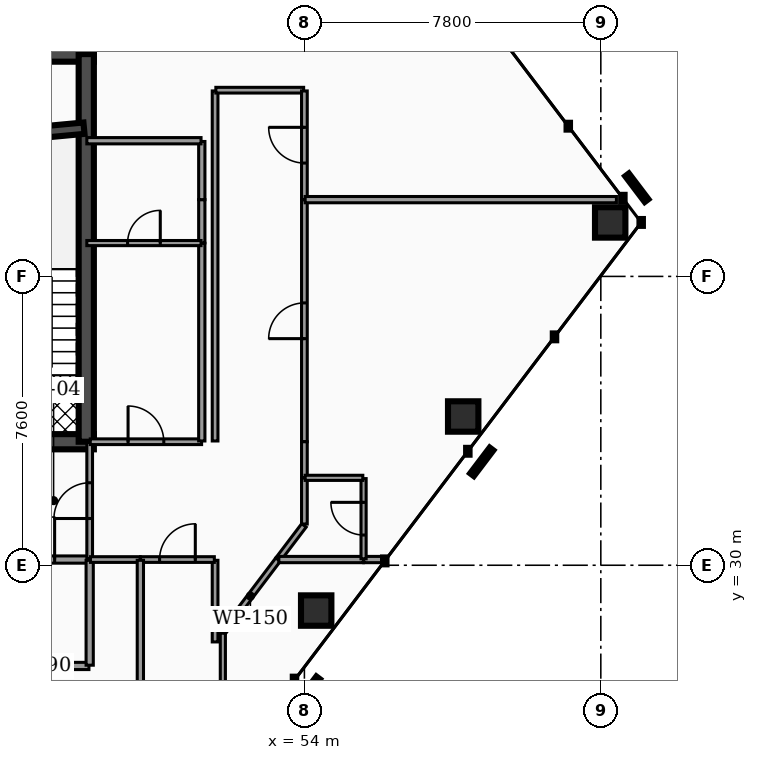
"""IFC4 building model, lengths in metres.
Left out: names, types, materials, properties, quantities, classifications, styles, units other than length and angle.
Written with IfcOpenShell. Run it as: python <this file> out.ifc"""

import sys

from ifc_helpers import new_model, si_unit, direction, frame, frame_2d, origin, origin_2d, place, context, subcontext, project, spatial, rectangle, hollow_rectangle, extrude, element, fill, save


model = new_model("IFC4")
c1 = context("Model", 3, precision=1e-05, world=origin(), true_north=direction((0.0, 1.0)))
c2 = subcontext(c1, "Body", "Model", "MODEL_VIEW")
j1 = project(units=[si_unit("LENGTHUNIT", "METRE"), si_unit("PLANEANGLEUNIT", "RADIAN")], contexts=[c1])
p1 = place(None, origin())
s1 = spatial("IfcSite", under=j1, at=p1, CompositionType="ELEMENT")
p2 = place(p1, origin())
s2 = spatial("IfcBuilding", under=s1, at=p2, CompositionType="ELEMENT")
p3 = place(p2, frame((0.0, 0.0, 142.12)))
s3 = spatial("IfcBuildingStorey", under=s2, at=p3, CompositionType="ELEMENT", Elevation=142.12)
p4 = place(p3, frame((28.4, 43.45, 0.0), z_axis=(0.0, 0.0, 1.0), x_axis=(1.0, 0.0, 0.0)))
e1 = element("IfcWall", 1, at=p4, inside=s3, PredefinedType="SHEAR", context=c2, shape_type="SweptSolid", body=[
    extrude(rectangle(XDim=20.06, YDim=0.4, at=frame_2d((10.03, 0.0))), origin(), (0.0, 0.0, 1.0), 3.5),
])
p5 = place(p3, frame((28.4, 33.25, 0.0), z_axis=(0.0, 0.0, 1.0), x_axis=(1.0, 0.0, 0.0)))
e2 = element("IfcWall", 2, at=p5, inside=s3, PredefinedType="SHEAR", context=c2, shape_type="SweptSolid", body=[
    extrude(rectangle(XDim=20.06, YDim=0.4, at=frame_2d((10.03, 0.0))), origin(), (0.0, 0.0, 1.0), 3.5),
])
p6 = place(p5, frame((4.03, 0.0, 0.0)))
e3 = element("IfcOpeningElement", 3, at=p6, cuts=e2, PredefinedType="OPENING", context=c2, shape_type="SweptSolid", body=[
    extrude(rectangle(XDim=1.1, YDim=2.15, at=frame_2d((0.55, 1.075))), frame((0.0, 0.21, 0.0), z_axis=(0.0, -1.0, 0.0), x_axis=(1.0, 0.0, 0.0)), (0.0, 0.0, 1.0), 0.42),
])
p7 = place(p5, frame((14.87, 0.0, 0.0)))
e4 = element("IfcOpeningElement", 4, at=p7, cuts=e2, PredefinedType="OPENING", context=c2, shape_type="SweptSolid", body=[
    extrude(rectangle(XDim=1.1, YDim=2.15, at=frame_2d((0.55, 1.075))), frame((0.0, 0.21, 0.0), z_axis=(0.0, -1.0, 0.0), x_axis=(1.0, 0.0, 0.0)), (0.0, 0.0, 1.0), 0.42),
])
p8 = place(p5, frame((5.95, 0.0, 0.0)))
e5 = element("IfcOpeningElement", 5, at=p8, cuts=e2, PredefinedType="OPENING", context=c2, shape_type="SweptSolid", body=[
    extrude(rectangle(XDim=1.0, YDim=2.1, at=frame_2d((0.5, 1.05))), frame((0.0, 0.21, 0.0), z_axis=(0.0, -1.0, 0.0), x_axis=(1.0, 0.0, 0.0)), (0.0, 0.0, 1.0), 0.42),
])
p9 = place(p5, frame((7.65, 0.0, 0.0)))
e6 = element("IfcOpeningElement", 6, at=p9, cuts=e2, PredefinedType="OPENING", context=c2, shape_type="SweptSolid", body=[
    extrude(rectangle(XDim=1.0, YDim=2.1, at=frame_2d((0.5, 1.05))), frame((0.0, 0.21, 0.0), z_axis=(0.0, -1.0, 0.0), x_axis=(1.0, 0.0, 0.0)), (0.0, 0.0, 1.0), 0.42),
])
p10 = place(p5, frame((1.31, 0.0, 0.0)))
e7 = element("IfcOpeningElement", 7, at=p10, cuts=e2, PredefinedType="OPENING", context=c2, shape_type="SweptSolid", body=[
    extrude(rectangle(XDim=1.1, YDim=2.2, at=frame_2d((0.55, 1.1))), frame((0.0, 0.21, 0.0), z_axis=(0.0, -1.0, 0.0), x_axis=(1.0, 0.0, 0.0)), (0.0, 0.0, 1.0), 0.42),
])
p11 = place(p5, frame((9.44, 0.0, 0.0)))
e8 = element("IfcOpeningElement", 8, at=p11, cuts=e2, PredefinedType="OPENING", context=c2, shape_type="SweptSolid", body=[
    extrude(rectangle(XDim=1.12, YDim=2.05, at=frame_2d((0.56, 1.025))), frame((0.0, 0.21, 0.0), z_axis=(0.0, -1.0, 0.0), x_axis=(1.0, 0.0, 0.0)), (0.0, 0.0, 1.0), 0.42),
])
p12 = place(p5, frame((17.65, 0.0, 0.0)))
e9 = element("IfcOpeningElement", 9, at=p12, cuts=e2, PredefinedType="OPENING", context=c2, shape_type="SweptSolid", body=[
    extrude(rectangle(XDim=1.1, YDim=2.2, at=frame_2d((0.55, 1.1))), frame((0.0, 0.21, 0.0), z_axis=(0.0, -1.0, 0.0), x_axis=(1.0, 0.0, 0.0)), (0.0, 0.0, 1.0), 0.42),
])
p13 = place(p3, frame((48.26, 33.25, 0.0), z_axis=(0.0, 0.0, 1.0), x_axis=(0.0, 1.0, 0.0)))
e10 = element("IfcWall", 10, at=p13, inside=s3, PredefinedType="SHEAR", context=c2, shape_type="SweptSolid", body=[
    extrude(rectangle(XDim=10.2, YDim=0.4, at=frame_2d((5.1, 0.0))), origin(), (0.0, 0.0, 1.0), 3.5),
])
p14 = place(p3, frame((44.98, 41.2, 0.0), z_axis=(0.0, 0.0, 1.0), x_axis=(0.995686468965, 0.09278176286, 0.0)))
e11 = element("IfcWall", 11, at=p14, inside=s3, PredefinedType="SHEAR", context=c2, shape_type="SweptSolid", body=[
    extrude(rectangle(XDim=3.234, YDim=0.3, at=frame_2d((1.617, 0.0))), origin(), (0.0, 0.0, 1.0), 3.5),
])
p15 = place(p3, frame((54.31, 28.808, 0.0), z_axis=(-0.036081962312, 0.038868214228, 0.998592686694), x_axis=(-0.732887043216, -0.68035033761, 0.0)))
e12 = element("IfcColumn", 12, at=p15, inside=s3, PredefinedType="COLUMN", context=c2, shape_type="SweptSolid", body=[
    extrude(hollow_rectangle(XDim=0.8, YDim=0.8, WallThickness=0.04, at=origin_2d()), origin(), (0.0, 0.0, 1.0), 3.505),
])
p16 = place(p3, frame((58.178, 33.914, 0.0), z_axis=(-0.008972958808, 0.074496425455, 0.99718091067), x_axis=(-0.992824103991, -0.119583855663, 0.0)))
e13 = element("IfcColumn", 13, at=p16, inside=s3, PredefinedType="COLUMN", context=c2, shape_type="SweptSolid", body=[
    extrude(hollow_rectangle(XDim=0.8, YDim=0.8, WallThickness=0.04, at=origin_2d()), origin(), (0.0, 0.0, 1.0), 3.51),
])
p17 = place(p3, frame((62.047, 39.02, 0.0), z_axis=(0.018023393121, 0.109873377298, 0.993782168416), x_axis=(-0.986811366095, 0.161874419675, 0.0)))
e14 = element("IfcColumn", 14, at=p17, inside=s3, PredefinedType="COLUMN", context=c2, shape_type="SweptSolid", body=[
    extrude(hollow_rectangle(XDim=0.8, YDim=0.8, WallThickness=0.04, at=origin_2d()), origin(), (0.0, 0.0, 1.0), 3.522),
])
p18 = place(p3, frame((45.405, 30.15, 0.0), z_axis=(0.0, 0.0, 1.0), x_axis=(1.0, 0.0, 0.0)))
e15 = element("IfcWall", 15, at=p18, inside=s3, PredefinedType="PARTITIONING", context=c2, shape_type="SweptSolid", body=[
    extrude(rectangle(XDim=2.925, YDim=0.19, at=frame_2d((1.462, 0.0))), origin(), (0.0, 0.0, 1.0), 2.457),
])
p19 = place(p18, frame((0.903, 0.0, 0.0)))
e16 = element("IfcOpeningElement", 16, at=p19, cuts=e15, PredefinedType="OPENING", context=c2, shape_type="SweptSolid", body=[
    extrude(rectangle(XDim=1.12, YDim=2.05, at=frame_2d((0.56, 1.025))), frame((0.0, 0.105, 0.0), z_axis=(0.0, -1.0, 0.0), x_axis=(1.0, 0.0, 0.0)), (0.0, 0.0, 1.0), 0.21),
])
p20 = place(p3, frame((48.35, 30.17, 0.0), z_axis=(0.0, 0.0, 1.0), x_axis=(0.0, 1.0, 0.0)))
e17 = element("IfcWall", 17, at=p20, inside=s3, PredefinedType="PARTITIONING", context=c2, shape_type="SweptSolid", body=[
    extrude(rectangle(XDim=3.06, YDim=0.15, at=frame_2d((1.53, 0.0))), origin(), (0.0, 0.0, 1.0), 2.457),
])
p21 = place(p20, frame((1.06, 0.0, 0.0)))
e18 = element("IfcOpeningElement", 18, at=p21, cuts=e17, PredefinedType="OPENING", context=c2, shape_type="SweptSolid", body=[
    extrude(rectangle(XDim=0.94, YDim=2.05, at=frame_2d((0.47, 1.025))), frame((0.0, 0.085, 0.0), z_axis=(0.0, -1.0, 0.0), x_axis=(1.0, 0.0, 0.0)), (0.0, 0.0, 1.0), 0.17),
])
p22 = place(p3, frame((45.42, 27.35, 0.0), z_axis=(0.0, 0.0, 1.0), x_axis=(1.0, 0.0, 0.0)))
e19 = element("IfcWall", 19, at=p22, inside=s3, PredefinedType="PARTITIONING", context=c2, shape_type="SweptSolid", body=[
    extrude(rectangle(XDim=2.91, YDim=0.19, at=frame_2d((1.455, 0.0))), origin(), (0.0, 0.0, 1.0), 2.457),
])
p23 = place(p3, frame((48.35, 27.37, 0.0), z_axis=(0.0, 0.0, 1.0), x_axis=(0.0, 1.0, 0.0)))
e20 = element("IfcWall", 20, at=p23, inside=s3, PredefinedType="PARTITIONING", context=c2, shape_type="SweptSolid", body=[
    extrude(rectangle(XDim=2.76, YDim=0.19, at=frame_2d((1.38, 0.0))), origin(), (0.0, 0.0, 1.0), 2.457),
])
p24 = place(p3, frame((48.37, 30.15, 0.0), z_axis=(0.0, 0.0, 1.0), x_axis=(1.0, 0.0, 0.0)))
e21 = element("IfcWall", 21, at=p24, inside=s3, PredefinedType="PARTITIONING", context=c2, shape_type="SweptSolid", body=[
    extrude(rectangle(XDim=1.309, YDim=0.15, at=frame_2d((0.654, 0.0))), origin(), (0.0, 0.0, 1.0), 2.457),
])
p25 = place(p3, frame((51.65, 27.982, 0.0), z_axis=(0.0, 0.0, 1.0), x_axis=(0.0, 1.0, 0.0)))
e22 = element("IfcWall", 22, at=p25, inside=s3, PredefinedType="PARTITIONING", context=c2, shape_type="SweptSolid", body=[
    extrude(rectangle(XDim=2.147, YDim=0.15, at=frame_2d((1.074, 0.0))), origin(), (0.0, 0.0, 1.0), 2.457),
])
p26 = place(p3, frame((49.689, 30.15, 0.0), z_axis=(0.0, 0.0, 1.0), x_axis=(1.0, 0.0, 0.0)))
e23 = element("IfcWall", 23, at=p26, inside=s3, PredefinedType="PARTITIONING", context=c2, shape_type="SweptSolid", body=[
    extrude(rectangle(XDim=1.941, YDim=0.15, at=frame_2d((0.971, 0.0))), origin(), (0.0, 0.0, 1.0), 2.457),
])
p27 = place(p26, frame((0.501, 0.0, 0.0)))
e24 = element("IfcOpeningElement", 24, at=p27, cuts=e23, PredefinedType="OPENING", context=c2, shape_type="SweptSolid", body=[
    extrude(rectangle(XDim=0.94, YDim=2.05, at=frame_2d((0.47, 1.025))), frame((0.0, 0.085, 0.0), z_axis=(0.0, -1.0, 0.0), x_axis=(1.0, 0.0, 0.0)), (0.0, 0.0, 1.0), 0.17),
])
p28 = place(p3, frame((51.851, 28.228, 0.0), z_axis=(0.0, 0.0, 1.0), x_axis=(0.60378553019, 0.797146808018, 0.0)))
e25 = element("IfcWall", 25, at=p28, inside=s3, PredefinedType="PARTITIONING", context=c2, shape_type="SweptSolid", body=[
    extrude(rectangle(XDim=2.41, YDim=0.15, at=frame_2d((1.205, 0.0))), origin(), (0.0, 0.0, 1.0), 2.457),
])
p29 = place(p3, frame((54.0, 33.25, 0.0), z_axis=(0.0, 0.0, 1.0), x_axis=(0.0, 1.0, 0.0)))
e26 = element("IfcWall", 26, at=p29, inside=s3, PredefinedType="PARTITIONING", context=c2, shape_type="SweptSolid", body=[
    extrude(rectangle(XDim=6.365, YDim=0.15, at=frame_2d((3.183, 0.0))), origin(), (0.0, 0.0, 1.0), 2.457),
])
p30 = place(p29, frame((2.712, 0.0, 0.0)))
e27 = element("IfcOpeningElement", 27, at=p30, cuts=e26, PredefinedType="OPENING", context=c2, shape_type="SweptSolid", body=[
    extrude(rectangle(XDim=0.94, YDim=2.05, at=frame_2d((0.47, 1.025))), frame((0.0, 0.085, 0.0), z_axis=(0.0, -1.0, 0.0), x_axis=(1.0, 0.0, 0.0)), (0.0, 0.0, 1.0), 0.17),
])
p31 = place(p3, frame((54.0, 32.305, 0.0), z_axis=(0.0, 0.0, 1.0), x_axis=(0.0, 1.0, 0.0)))
e28 = element("IfcWall", 28, at=p31, inside=s3, PredefinedType="PARTITIONING", context=c2, shape_type="SweptSolid", body=[
    extrude(rectangle(XDim=0.945, YDim=0.15, at=frame_2d((0.473, 0.0))), origin(), (0.0, 0.0, 1.0), 2.457),
])
p32 = place(p3, frame((54.0, 31.085, 0.0), z_axis=(0.0, 0.0, 1.0), x_axis=(0.0, 1.0, 0.0)))
e29 = element("IfcWall", 29, at=p32, inside=s3, PredefinedType="PARTITIONING", context=c2, shape_type="SweptSolid", body=[
    extrude(rectangle(XDim=1.21, YDim=0.15, at=frame_2d((0.605, 0.0))), origin(), (0.0, 0.0, 1.0), 2.457),
])
p33 = place(p3, frame((53.31, 30.154, 0.0), z_axis=(0.0, 0.0, 1.0), x_axis=(0.603752960425, 0.797171476395, 0.0)))
e30 = element("IfcWall", 30, at=p33, inside=s3, PredefinedType="PARTITIONING", context=c2, shape_type="SweptSolid", body=[
    extrude(rectangle(XDim=1.122, YDim=0.15, at=frame_2d((0.561, 0.0))), origin(), (0.0, 0.0, 1.0), 2.457),
])
p34 = place(p3, frame((51.65, 33.27, 0.0), z_axis=(0.0, 0.0, 1.0), x_axis=(0.0, 1.0, 0.0)))
e31 = element("IfcWall", 31, at=p34, inside=s3, PredefinedType="PARTITIONING", context=c2, shape_type="SweptSolid", body=[
    extrude(rectangle(XDim=9.21, YDim=0.15, at=frame_2d((4.605, 0.0))), origin(), (0.0, 0.0, 1.0), 2.457),
])
p35 = place(p3, frame((51.67, 42.5, 0.0), z_axis=(0.0, 0.0, 1.0), x_axis=(1.0, 0.0, 0.0)))
e32 = element("IfcWall", 32, at=p35, inside=s3, PredefinedType="PARTITIONING", context=c2, shape_type="SweptSolid", body=[
    extrude(rectangle(XDim=2.31, YDim=0.15, at=frame_2d((1.155, 0.0))), origin(), (0.0, 0.0, 1.0), 2.457),
])
p36 = place(p3, frame((54.0, 39.625, 0.0), z_axis=(0.0, 0.0, 1.0), x_axis=(0.0, 1.0, 0.0)))
e33 = element("IfcWall", 33, at=p36, inside=s3, PredefinedType="PARTITIONING", context=c2, shape_type="SweptSolid", body=[
    extrude(rectangle(XDim=2.855, YDim=0.15, at=frame_2d((1.427, 0.0))), origin(), (0.0, 0.0, 1.0), 2.457),
])
p37 = place(p36, frame((0.958, 0.0, 0.0)))
e34 = element("IfcOpeningElement", 34, at=p37, cuts=e33, PredefinedType="OPENING", context=c2, shape_type="SweptSolid", body=[
    extrude(rectangle(XDim=0.94, YDim=2.05, at=frame_2d((0.47, 1.025))), frame((0.0, 0.085, 0.0), z_axis=(0.0, -1.0, 0.0), x_axis=(1.0, 0.0, 0.0)), (0.0, 0.0, 1.0), 0.17),
])
p38 = place(p3, frame((48.365, 33.25, 0.0), z_axis=(0.0, 0.0, 1.0), x_axis=(1.0, 0.0, 0.0)))
e35 = element("IfcWall", 35, at=p38, inside=s3, PredefinedType="PARTITIONING", context=c2, shape_type="SweptSolid", body=[
    extrude(rectangle(XDim=2.93, YDim=0.15, at=frame_2d((1.465, 0.0))), origin(), (0.0, 0.0, 1.0), 2.457),
])
p39 = place(p38, frame((0.995, 0.0, 0.0)))
e36 = element("IfcOpeningElement", 36, at=p39, cuts=e35, PredefinedType="OPENING", context=c2, shape_type="SweptSolid", body=[
    extrude(rectangle(XDim=0.94, YDim=2.05, at=frame_2d((0.47, 1.025))), frame((0.0, 0.085, 0.0), z_axis=(0.0, -1.0, 0.0), x_axis=(1.0, 0.0, 0.0)), (0.0, 0.0, 1.0), 0.17),
])
p40 = place(p3, frame((49.684, 24.078, 0.0), z_axis=(0.0, 0.0, 1.0), x_axis=(0.0, 1.0, 0.0)))
e37 = element("IfcWall", 37, at=p40, inside=s3, PredefinedType="PARTITIONING", context=c2, shape_type="SweptSolid", body=[
    extrude(rectangle(XDim=6.052, YDim=0.165, at=frame_2d((3.026, 0.0))), origin(), (0.0, 0.0, 1.0), 2.457),
])
p41 = place(p3, frame((51.854, 24.504, 0.0), z_axis=(0.0, 0.0, 1.0), x_axis=(0.0, 1.0, 0.0)))
e38 = element("IfcWall", 38, at=p41, inside=s3, PredefinedType="PARTITIONING", context=c2, shape_type="SweptSolid", body=[
    extrude(rectangle(XDim=3.708, YDim=0.135, at=frame_2d((1.854, 0.0))), origin(), (0.0, 0.0, 1.0), 2.457),
])
p42 = place(p41, frame((1.424, 0.0, 0.0)))
e39 = element("IfcOpeningElement", 39, at=p42, cuts=e38, PredefinedType="OPENING", context=c2, shape_type="SweptSolid", body=[
    extrude(rectangle(XDim=0.86, YDim=2.05, at=frame_2d((0.43, 1.025))), frame((0.0, 0.077, 0.0), z_axis=(0.0, -1.0, 0.0), x_axis=(1.0, 0.0, 0.0)), (0.0, 0.0, 1.0), 0.155),
])
p43 = place(p3, frame((55.562, 30.15, 0.0), z_axis=(0.0, 0.0, 1.0), x_axis=(1.0, 0.0, 0.0)))
e40 = element("IfcWall", 40, at=p43, inside=s3, PredefinedType="PARTITIONING", context=c2, shape_type="SweptSolid", body=[
    extrude(rectangle(XDim=0.565, YDim=0.165, at=frame_2d((0.283, 0.0))), origin(), (0.0, 0.0, 1.0), 2.457),
])
p44 = place(p3, frame((53.327, 30.15, 0.0), z_axis=(0.0, 0.0, 1.0), x_axis=(1.0, 0.0, 0.0)))
e41 = element("IfcWall", 41, at=p44, inside=s3, PredefinedType="PARTITIONING", context=c2, shape_type="SweptSolid", body=[
    extrude(rectangle(XDim=2.225, YDim=0.165, at=frame_2d((1.113, 0.0))), origin(), (0.0, 0.0, 1.0), 2.457),
])
p45 = place(p3, frame((55.557, 30.17, 0.0), z_axis=(0.0, 0.0, 1.0), x_axis=(0.0, 1.0, 0.0)))
e42 = element("IfcWall", 42, at=p45, inside=s3, PredefinedType="PARTITIONING", context=c2, shape_type="SweptSolid", body=[
    extrude(rectangle(XDim=2.11, YDim=0.135, at=frame_2d((1.055, 0.0))), origin(), (0.0, 0.0, 1.0), 2.457),
])
p46 = place(p45, frame((0.625, 0.0, 0.0)))
e43 = element("IfcOpeningElement", 43, at=p46, cuts=e42, PredefinedType="OPENING", context=c2, shape_type="SweptSolid", body=[
    extrude(rectangle(XDim=0.86, YDim=2.05, at=frame_2d((0.43, 1.025))), frame((0.0, 0.077, 0.0), z_axis=(0.0, -1.0, 0.0), x_axis=(1.0, 0.0, 0.0)), (0.0, 0.0, 1.0), 0.155),
])
p47 = place(p3, frame((54.02, 32.3, 0.0), z_axis=(0.0, 0.0, 1.0), x_axis=(1.0, 0.0, 0.0)))
e44 = element("IfcWall", 44, at=p47, inside=s3, PredefinedType="PARTITIONING", context=c2, shape_type="SweptSolid", body=[
    extrude(rectangle(XDim=1.517, YDim=0.135, at=frame_2d((0.759, 0.0))), origin(), (0.0, 0.0, 1.0), 2.457),
])
p48 = place(p3, frame((54.02, 39.62, 0.0), z_axis=(0.0, 0.0, 1.0), x_axis=(1.0, 0.0, 0.0)))
e45 = element("IfcWall", 45, at=p48, inside=s3, PredefinedType="PARTITIONING", context=c2, shape_type="SweptSolid", body=[
    extrude(rectangle(XDim=8.191, YDim=0.165, at=frame_2d((4.095, 0.0))), origin(), (0.0, 0.0, 1.0), 2.457),
])
p49 = place(p3, frame((51.3, 33.27, 0.0), z_axis=(0.0, 0.0, 1.0), x_axis=(0.0, 1.0, 0.0)))
e46 = element("IfcWall", 46, at=p49, inside=s3, PredefinedType="PARTITIONING", context=c2, shape_type="SweptSolid", body=[
    extrude(rectangle(XDim=5.202, YDim=0.165, at=frame_2d((2.601, 0.0))), origin(), (0.0, 0.0, 1.0), 2.457),
])
p50 = place(p3, frame((51.3, 38.482, 0.0), z_axis=(0.0, 0.0, 1.0), x_axis=(0.0, 1.0, 0.0)))
e47 = element("IfcWall", 47, at=p50, inside=s3, PredefinedType="PARTITIONING", context=c2, shape_type="SweptSolid", body=[
    extrude(rectangle(XDim=1.138, YDim=0.165, at=frame_2d((0.569, 0.0))), origin(), (0.0, 0.0, 1.0), 2.457),
])
p51 = place(p3, frame((51.3, 39.62, 0.0), z_axis=(0.0, 0.0, 1.0), x_axis=(0.0, 1.0, 0.0)))
e48 = element("IfcWall", 48, at=p51, inside=s3, PredefinedType="PARTITIONING", context=c2, shape_type="SweptSolid", body=[
    extrude(rectangle(XDim=1.53, YDim=0.165, at=frame_2d((0.765, 0.0))), origin(), (0.0, 0.0, 1.0), 2.457),
])
p52 = place(p3, frame((48.275, 41.17, 0.0), z_axis=(0.0, 0.0, 1.0), x_axis=(1.0, 0.0, 0.0)))
e49 = element("IfcWall", 49, at=p52, inside=s3, PredefinedType="PARTITIONING", context=c2, shape_type="SweptSolid", body=[
    extrude(rectangle(XDim=3.005, YDim=0.165, at=frame_2d((1.502, 0.0))), origin(), (0.0, 0.0, 1.0), 2.457),
])
p53 = place(p3, frame((48.275, 38.477, 0.0), z_axis=(0.0, 0.0, 1.0), x_axis=(1.0, 0.0, 0.0)))
e50 = element("IfcWall", 50, at=p53, inside=s3, PredefinedType="PARTITIONING", context=c2, shape_type="SweptSolid", body=[
    extrude(rectangle(XDim=3.005, YDim=0.135, at=frame_2d((1.502, 0.0))), origin(), (0.0, 0.0, 1.0), 2.457),
])
p54 = place(p53, frame((1.073, 0.0, 0.0)))
e51 = element("IfcOpeningElement", 51, at=p54, cuts=e50, PredefinedType="OPENING", context=c2, shape_type="SweptSolid", body=[
    extrude(rectangle(XDim=0.86, YDim=2.05, at=frame_2d((0.43, 1.025))), frame((0.0, 0.077, 0.0), z_axis=(0.0, -1.0, 0.0), x_axis=(1.0, 0.0, 0.0)), (0.0, 0.0, 1.0), 0.155),
])
p55 = place(p19, origin())
e52 = element("IfcDoor", 52, at=p55, inside=s3, OperationType="SINGLE_SWING_RIGHT", PredefinedType="DOOR", context=c2, shape_type="SweptSolid", body=[
    extrude(rectangle(XDim=1.12, YDim=2.05, at=frame_2d((0.56, 1.025))), frame((0.0, 0.025, 0.0), z_axis=(0.0, -1.0, 0.0), x_axis=(1.0, 0.0, 0.0)), (0.0, 0.0, 1.0), 0.05),
])
fill(e16, e52)
p56 = place(p21, origin())
e53 = element("IfcDoor", 53, at=p56, inside=s3, OperationType="SINGLE_SWING_LEFT", PredefinedType="DOOR", context=c2, shape_type="SweptSolid", body=[
    extrude(rectangle(XDim=0.94, YDim=2.05, at=frame_2d((0.47, 1.025))), frame((0.0, 0.025, 0.0), z_axis=(0.0, -1.0, 0.0), x_axis=(1.0, 0.0, 0.0)), (0.0, 0.0, 1.0), 0.05),
])
fill(e18, e53)
p57 = place(p27, origin())
e54 = element("IfcDoor", 54, at=p57, inside=s3, OperationType="SINGLE_SWING_RIGHT", PredefinedType="DOOR", context=c2, shape_type="SweptSolid", body=[
    extrude(rectangle(XDim=0.94, YDim=2.05, at=frame_2d((0.47, 1.025))), frame((0.0, 0.025, 0.0), z_axis=(0.0, -1.0, 0.0), x_axis=(1.0, 0.0, 0.0)), (0.0, 0.0, 1.0), 0.05),
])
fill(e24, e54)
p58 = place(p30, origin())
e55 = element("IfcDoor", 55, at=p58, inside=s3, OperationType="SINGLE_SWING_LEFT", PredefinedType="DOOR", context=c2, shape_type="SweptSolid", body=[
    extrude(rectangle(XDim=0.94, YDim=2.05, at=frame_2d((0.47, 1.025))), frame((0.0, 0.025, 0.0), z_axis=(0.0, -1.0, 0.0), x_axis=(1.0, 0.0, 0.0)), (0.0, 0.0, 1.0), 0.05),
])
fill(e27, e55)
p59 = place(p37, origin())
e56 = element("IfcDoor", 56, at=p59, inside=s3, OperationType="SINGLE_SWING_RIGHT", PredefinedType="DOOR", context=c2, shape_type="SweptSolid", body=[
    extrude(rectangle(XDim=0.94, YDim=2.05, at=frame_2d((0.47, 1.025))), frame((0.0, 0.025, 0.0), z_axis=(0.0, -1.0, 0.0), x_axis=(1.0, 0.0, 0.0)), (0.0, 0.0, 1.0), 0.05),
])
fill(e34, e56)
p60 = place(p39, origin())
e57 = element("IfcDoor", 57, at=p60, inside=s3, OperationType="SINGLE_SWING_LEFT", PredefinedType="DOOR", context=c2, shape_type="SweptSolid", body=[
    extrude(rectangle(XDim=0.94, YDim=2.05, at=frame_2d((0.47, 1.025))), frame((0.0, 0.025, 0.0), z_axis=(0.0, -1.0, 0.0), x_axis=(1.0, 0.0, 0.0)), (0.0, 0.0, 1.0), 0.05),
])
fill(e36, e57)
p61 = place(p46, origin())
e58 = element("IfcDoor", 58, at=p61, inside=s3, OperationType="SINGLE_SWING_RIGHT", PredefinedType="DOOR", context=c2, shape_type="SweptSolid", body=[
    extrude(rectangle(XDim=0.86, YDim=2.05, at=frame_2d((0.43, 1.025))), frame((0.0, 0.025, 0.0), z_axis=(0.0, -1.0, 0.0), x_axis=(1.0, 0.0, 0.0)), (0.0, 0.0, 1.0), 0.05),
])
fill(e43, e58)
p62 = place(p54, origin())
e59 = element("IfcDoor", 59, at=p62, inside=s3, OperationType="SINGLE_SWING_RIGHT", PredefinedType="DOOR", context=c2, shape_type="SweptSolid", body=[
    extrude(rectangle(XDim=0.86, YDim=2.05, at=frame_2d((0.43, 1.025))), frame((0.0, 0.025, 0.0), z_axis=(0.0, -1.0, 0.0), x_axis=(1.0, 0.0, 0.0)), (0.0, 0.0, 1.0), 0.05),
])
fill(e51, e59)
save(model, sys.argv[1])
